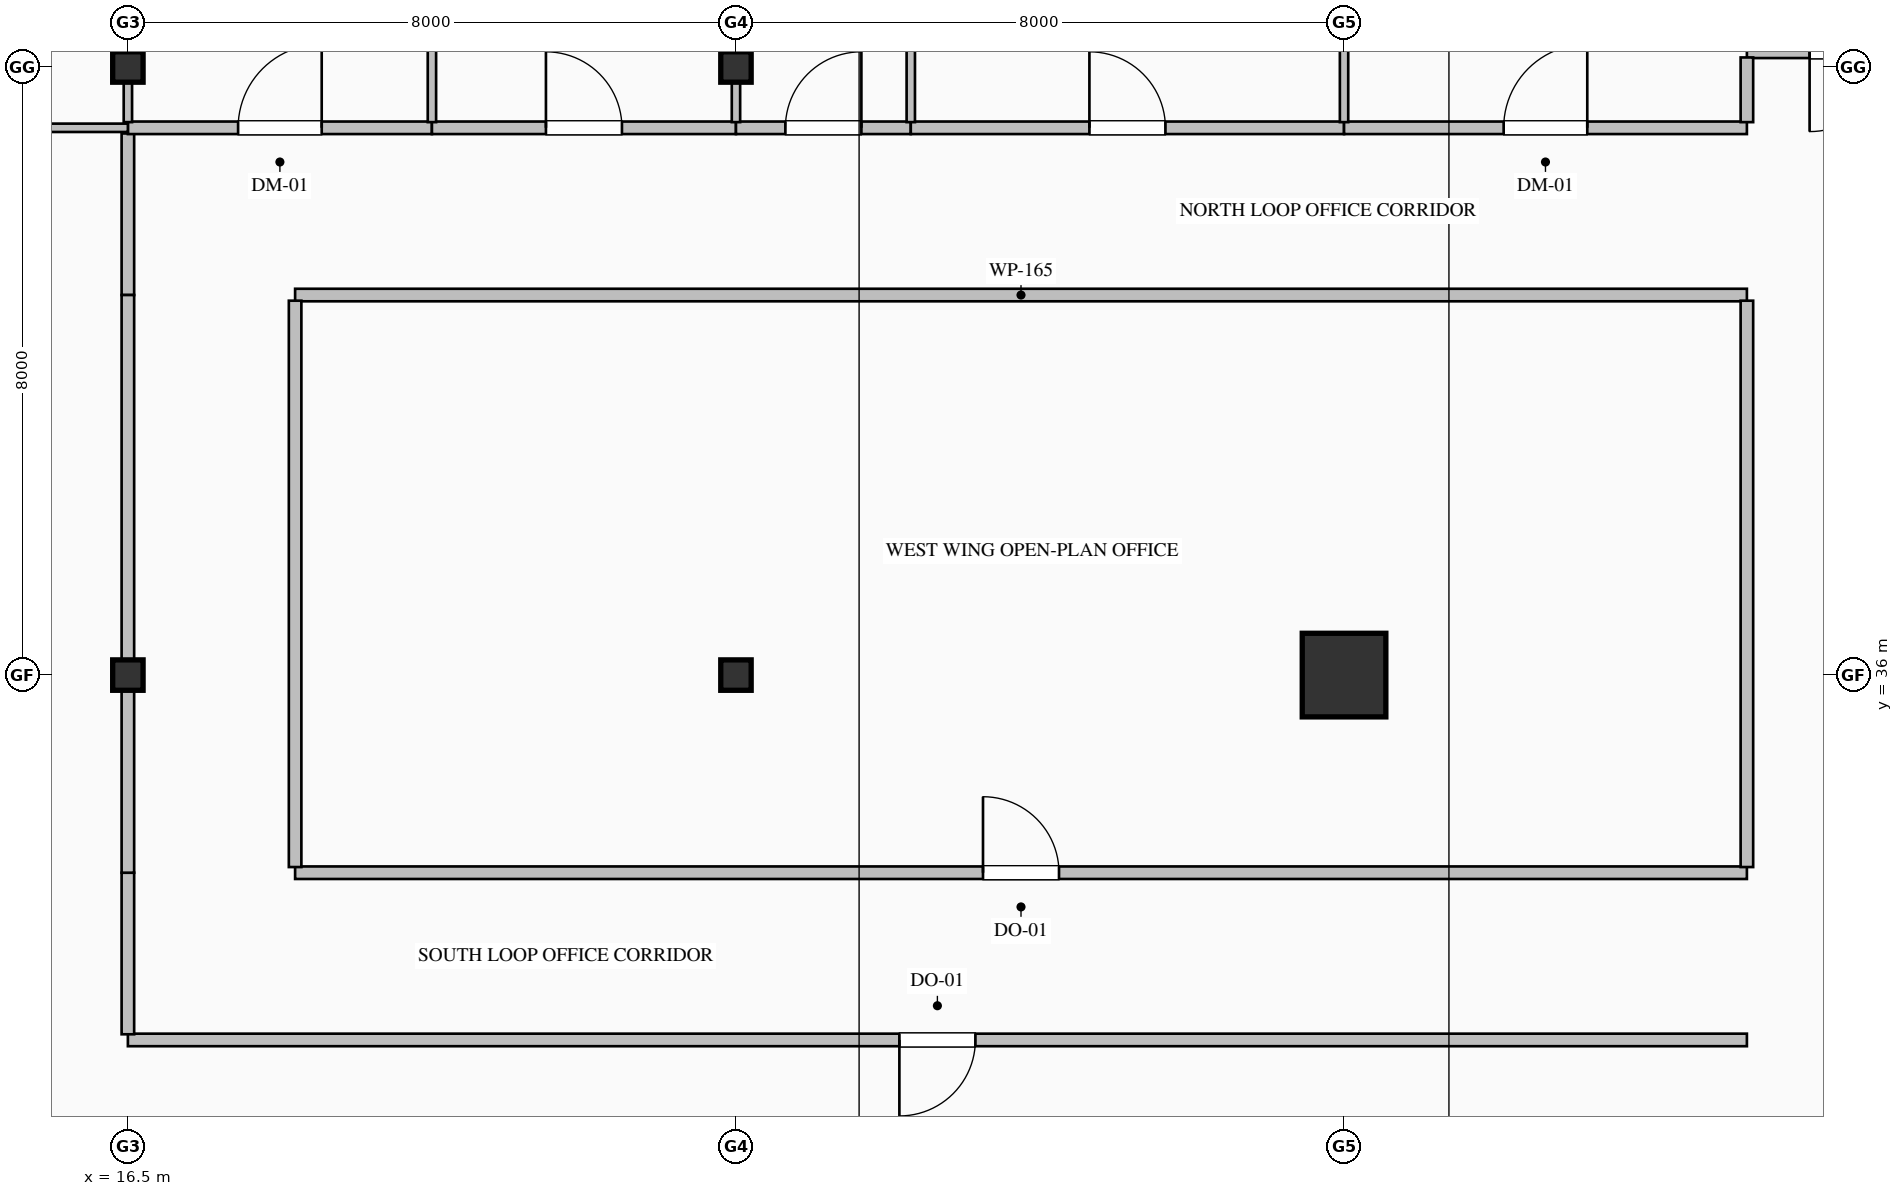
"""IFC4 building model, lengths in metres.
Left out: names, types, materials, properties, quantities, classifications, styles, units other than length and angle.
Written with IfcOpenShell. Run it as: python <this file> out.ifc"""

import sys

from ifc_helpers import new_model, si_unit, direction, frame, frame_2d, origin, origin_2d, place, context, subcontext, project, spatial, rectangle, hollow_rectangle, i_section, extrude, element, fill, save


model = new_model("IFC4")
c1 = context("Model", 3, precision=1e-05, world=origin(), true_north=direction((0.0, 1.0)))
c2 = subcontext(c1, "Body", "Model", "MODEL_VIEW")
j1 = project(units=[si_unit("LENGTHUNIT", "METRE"), si_unit("PLANEANGLEUNIT", "RADIAN")], contexts=[c1])
p1 = place(None, origin())
s1 = spatial("IfcSite", under=j1, at=p1, CompositionType="ELEMENT")
p2 = place(p1, origin())
s2 = spatial("IfcBuilding", under=s1, at=p2, CompositionType="ELEMENT")
p3 = place(p2, frame((0.0, 0.0, 123.0)))
s3 = spatial("IfcBuildingStorey", under=s2, at=p3, CompositionType="ELEMENT", Elevation=123.0)
for number, where, z_axis, x_axis in (
    (1, (16.5, 36.0, 0.0), (0.0, 0.0, 1.0), (1.0, 0.0, 0.0)),
    (2, (16.5, 44.0, 0.0), (0.0, 0.0, 1.0), (1.0, 0.0, 0.0)),
    (3, (24.5, 36.0, 0.0), (0.0, 0.0, 1.0), (1.0, 0.0, 0.0)),
    (4, (24.5, 44.0, 0.0), (0.0, 0.0, 1.0), (1.0, 0.0, 0.0)),
):
    element("IfcColumn", number, at=place(p3, frame(where, z_axis=z_axis, x_axis=x_axis)), inside=s3, PredefinedType="COLUMN", context=c2, shape_type="SweptSolid", body=[
        extrude(i_section(OverallWidth=0.4, OverallDepth=0.4, WebThickness=0.013, FlangeThickness=0.021, FilletRadius=0.022, at=origin_2d()), origin(), (0.0, 0.0, 1.0), 4.0),
    ])
p4 = place(p3, frame((32.5, 36.0, 0.0), z_axis=(0.0, 0.0, 1.0), x_axis=(1.0, 0.0, 0.0)))
e5 = element("IfcColumn", 5, at=p4, inside=s3, PredefinedType="COLUMN", context=c2, shape_type="SweptSolid", body=[
    extrude(hollow_rectangle(XDim=1.1, YDim=1.1, WallThickness=0.04, at=origin_2d()), origin(), (0.0, 0.0, 1.0), 4.0),
])
p5 = place(p3, frame((40.5, 44.2, 0.0), z_axis=(0.0, 0.0, 1.0), x_axis=(-1.0, 0.0, 0.0)))
e6 = element("IfcWall", 6, at=p5, inside=s3, PredefinedType="PARTITIONING", context=c2, shape_type="SweptSolid", body=[
    extrude(rectangle(XDim=2.7, YDim=0.165, at=frame_2d((1.35, 0.0))), origin(), (0.0, 0.0, 1.0), 3.765),
])
p6 = place(p5, frame((0.825, 0.0, 0.0)))
e7 = element("IfcOpeningElement", 7, at=p6, cuts=e6, PredefinedType="OPENING", context=c2, shape_type="SweptSolid", body=[
    extrude(rectangle(XDim=1.05, YDim=2.15, at=frame_2d((0.525, 1.075))), frame((0.0, 0.093, 0.0), z_axis=(0.0, -1.0, 0.0), x_axis=(1.0, 0.0, 0.0)), (0.0, 0.0, 1.0), 0.185),
])
p7 = place(p3, frame((37.8, 31.2, 0.0), z_axis=(0.0, 0.0, 1.0), x_axis=(-1.0, 0.0, 0.0)))
e8 = element("IfcWall", 8, at=p7, inside=s3, PredefinedType="PARTITIONING", context=c2, shape_type="SweptSolid", body=[
    extrude(rectangle(XDim=21.3, YDim=0.165, at=frame_2d((10.65, 0.0))), origin(), (0.0, 0.0, 1.0), 3.765),
])
p8 = place(p7, frame((10.15, 0.0, 0.0)))
e9 = element("IfcOpeningElement", 9, at=p8, cuts=e8, PredefinedType="OPENING", context=c2, shape_type="SweptSolid", body=[
    extrude(rectangle(XDim=1.0, YDim=2.15, at=frame_2d((0.5, 1.075))), frame((0.0, 0.093, 0.0), z_axis=(0.0, -1.0, 0.0), x_axis=(1.0, 0.0, 0.0)), (0.0, 0.0, 1.0), 0.185),
])
p9 = place(p3, frame((16.5, 31.274, 0.0), z_axis=(0.0, 0.0, 1.0), x_axis=(0.0, 1.0, 0.0)))
e10 = element("IfcWall", 10, at=p9, inside=s3, PredefinedType="PARTITIONING", context=c2, shape_type="SweptSolid", body=[
    extrude(rectangle(XDim=2.125, YDim=0.165, at=frame_2d((1.063, 0.0))), origin(), (0.0, 0.0, 1.0), 3.157),
])
p10 = place(p3, frame((18.7, 33.4, 0.0), z_axis=(0.0, 0.0, 1.0), x_axis=(1.0, 0.0, 0.0)))
e11 = element("IfcWall", 11, at=p10, inside=s3, PredefinedType="PARTITIONING", context=c2, shape_type="SweptSolid", body=[
    extrude(rectangle(XDim=19.1, YDim=0.165, at=frame_2d((9.55, 0.0))), origin(), (0.0, 0.0, 1.0), 3.765),
])
p11 = place(p10, frame((9.05, 0.0, 0.0)))
e12 = element("IfcOpeningElement", 12, at=p11, cuts=e11, PredefinedType="OPENING", context=c2, shape_type="SweptSolid", body=[
    extrude(rectangle(XDim=1.0, YDim=2.15, at=frame_2d((0.5, 1.075))), frame((0.0, 0.093, 0.0), z_axis=(0.0, -1.0, 0.0), x_axis=(1.0, 0.0, 0.0)), (0.0, 0.0, 1.0), 0.185),
])
p12 = place(p3, frame((16.5, 41.0, 0.0), z_axis=(0.0, 0.0, 1.0), x_axis=(0.0, 1.0, 0.0)))
e13 = element("IfcWall", 13, at=p12, inside=s3, PredefinedType="PARTITIONING", context=c2, shape_type="SweptSolid", body=[
    extrude(rectangle(XDim=2.125, YDim=0.165, at=frame_2d((1.063, 0.0))), origin(), (0.0, 0.0, 1.0), 3.157),
])
p13 = place(p3, frame((37.8, 41.0, 0.0), z_axis=(0.0, 0.0, 1.0), x_axis=(-1.0, 0.0, 0.0)))
e14 = element("IfcWall", 14, at=p13, inside=s3, PredefinedType="PARTITIONING", context=c2, shape_type="SweptSolid", body=[
    extrude(rectangle(XDim=19.1, YDim=0.165, at=frame_2d((9.55, 0.0))), origin(), (0.0, 0.0, 1.0), 3.765),
])
p14 = place(p3, frame((16.5, 43.2, 0.0), z_axis=(0.0, 0.0, 1.0), x_axis=(1.0, 0.0, 0.0)))
e15 = element("IfcWall", 15, at=p14, inside=s3, PredefinedType="PARTITIONING", context=c2, shape_type="SweptSolid", body=[
    extrude(rectangle(XDim=4.0, YDim=0.165, at=frame_2d((2.0, 0.0))), origin(), (0.0, 0.0, 1.0), 3.765),
])
p15 = place(p14, frame((1.45, 0.0, 0.0)))
e16 = element("IfcOpeningElement", 16, at=p15, cuts=e15, PredefinedType="OPENING", context=c2, shape_type="SweptSolid", body=[
    extrude(rectangle(XDim=1.1, YDim=2.2, at=frame_2d((0.55, 1.1))), frame((0.0, 0.093, 0.0), z_axis=(0.0, -1.0, 0.0), x_axis=(1.0, 0.0, 0.0)), (0.0, 0.0, 1.0), 0.185),
])
p16 = place(p3, frame((20.5, 43.2, 0.0), z_axis=(0.0, 0.0, 1.0), x_axis=(1.0, 0.0, 0.0)))
e17 = element("IfcWall", 17, at=p16, inside=s3, PredefinedType="PARTITIONING", context=c2, shape_type="SweptSolid", body=[
    extrude(rectangle(XDim=4.0, YDim=0.165, at=frame_2d((2.0, 0.0))), origin(), (0.0, 0.0, 1.0), 3.765),
])
p17 = place(p16, frame((1.5, 0.0, 0.0)))
e18 = element("IfcOpeningElement", 18, at=p17, cuts=e17, PredefinedType="OPENING", context=c2, shape_type="SweptSolid", body=[
    extrude(rectangle(XDim=1.0, YDim=2.15, at=frame_2d((0.5, 1.075))), frame((0.0, 0.093, 0.0), z_axis=(0.0, -1.0, 0.0), x_axis=(1.0, 0.0, 0.0)), (0.0, 0.0, 1.0), 0.185),
])
p18 = place(p3, frame((24.5, 43.2, 0.0), z_axis=(0.0, 0.0, 1.0), x_axis=(1.0, 0.0, 0.0)))
e19 = element("IfcWall", 19, at=p18, inside=s3, PredefinedType="PARTITIONING", context=c2, shape_type="SweptSolid", body=[
    extrude(rectangle(XDim=2.3, YDim=0.165, at=frame_2d((1.15, 0.0))), origin(), (0.0, 0.0, 1.0), 3.765),
])
p19 = place(p18, frame((0.65, 0.0, 0.0)))
e20 = element("IfcOpeningElement", 20, at=p19, cuts=e19, PredefinedType="OPENING", context=c2, shape_type="SweptSolid", body=[
    extrude(rectangle(XDim=1.0, YDim=2.15, at=frame_2d((0.5, 1.075))), frame((0.0, 0.093, 0.0), z_axis=(0.0, -1.0, 0.0), x_axis=(1.0, 0.0, 0.0)), (0.0, 0.0, 1.0), 0.185),
])
p20 = place(p3, frame((26.8, 43.2, 0.0), z_axis=(0.0, 0.0, 1.0), x_axis=(1.0, 0.0, 0.0)))
e21 = element("IfcWall", 21, at=p20, inside=s3, PredefinedType="PARTITIONING", context=c2, shape_type="SweptSolid", body=[
    extrude(rectangle(XDim=5.7, YDim=0.165, at=frame_2d((2.85, 0.0))), origin(), (0.0, 0.0, 1.0), 3.765),
])
p21 = place(p20, frame((2.35, 0.0, 0.0)))
e22 = element("IfcOpeningElement", 22, at=p21, cuts=e21, PredefinedType="OPENING", context=c2, shape_type="SweptSolid", body=[
    extrude(rectangle(XDim=1.0, YDim=2.15, at=frame_2d((0.5, 1.075))), frame((0.0, 0.093, 0.0), z_axis=(0.0, -1.0, 0.0), x_axis=(1.0, 0.0, 0.0)), (0.0, 0.0, 1.0), 0.185),
])
p22 = place(p3, frame((32.5, 43.2, 0.0), z_axis=(0.0, 0.0, 1.0), x_axis=(1.0, 0.0, 0.0)))
e23 = element("IfcWall", 23, at=p22, inside=s3, PredefinedType="PARTITIONING", context=c2, shape_type="SweptSolid", body=[
    extrude(rectangle(XDim=5.3, YDim=0.165, at=frame_2d((2.65, 0.0))), origin(), (0.0, 0.0, 1.0), 3.765),
])
p23 = place(p22, frame((2.1, 0.0, 0.0)))
e24 = element("IfcOpeningElement", 24, at=p23, cuts=e23, PredefinedType="OPENING", context=c2, shape_type="SweptSolid", body=[
    extrude(rectangle(XDim=1.1, YDim=2.2, at=frame_2d((0.55, 1.1))), frame((0.0, 0.093, 0.0), z_axis=(0.0, -1.0, 0.0), x_axis=(1.0, 0.0, 0.0)), (0.0, 0.0, 1.0), 0.185),
])
p24 = place(p3, frame((16.5, 33.4, 0.0), z_axis=(0.0, 0.0, 1.0), x_axis=(0.0, 1.0, 0.0)))
e25 = element("IfcWall", 25, at=p24, inside=s3, PredefinedType="PARTITIONING", context=c2, shape_type="SweptSolid", body=[
    extrude(rectangle(XDim=7.6, YDim=0.165, at=frame_2d((3.8, 0.0))), origin(), (0.0, 0.0, 1.0), 3.157),
])
for number, where, z_axis, x_axis in (
    (26, (18.7, 40.926, 0.0), (0.0, 0.0, 1.0), (0.0, -1.0, 0.0)),
    (27, (37.8, 33.475, 0.0), (0.0, 0.0, 1.0), (0.0, 1.0, 0.0)),
):
    element("IfcWall", number, at=place(p3, frame(where, z_axis=z_axis, x_axis=x_axis)), inside=s3, PredefinedType="PARTITIONING", context=c2, shape_type="SweptSolid", body=[
        extrude(rectangle(XDim=7.451, YDim=0.165, at=frame_2d((3.726, 0.0))), origin(), (0.0, 0.0, 1.0), 3.765),
    ])
p25 = place(p3, frame((37.8, 43.274, 0.0), z_axis=(0.0, 0.0, 1.0), x_axis=(0.0, 1.0, 0.0)))
e28 = element("IfcWall", 28, at=p25, inside=s3, PredefinedType="PARTITIONING", context=c2, shape_type="SweptSolid", body=[
    extrude(rectangle(XDim=0.851, YDim=0.165, at=frame_2d((0.426, 0.0))), origin(), (0.0, 0.0, 1.0), 3.765),
])
p26 = place(p3, frame((12.8, 43.2, 0.0), z_axis=(0.0, 0.0, 1.0), x_axis=(1.0, 0.0, 0.0)))
e29 = element("IfcWall", 29, at=p26, inside=s3, PredefinedType="MOVABLE", context=c2, shape_type="SweptSolid", body=[
    extrude(rectangle(XDim=3.7, YDim=0.11, at=frame_2d((1.85, 0.0))), origin(), (0.0, 0.0, 1.0), 3.765),
])
p27 = place(p3, frame((16.5, 51.668, 0.0), z_axis=(0.0, 0.0, 1.0), x_axis=(0.0, -1.0, 0.0)))
e30 = element("IfcWall", 30, at=p27, inside=s3, PredefinedType="MOVABLE", context=c2, shape_type="SweptSolid", body=[
    extrude(rectangle(XDim=8.394, YDim=0.11, at=frame_2d((4.197, 0.0))), origin(), (0.0, 0.0, 1.0), 3.157),
])
p28 = place(p27, frame((3.697, 0.0, 0.0)))
e31 = element("IfcOpeningElement", 31, at=p28, cuts=e30, PredefinedType="OPENING", context=c2, shape_type="SweptSolid", body=[
    extrude(rectangle(XDim=1.0, YDim=2.15, at=frame_2d((0.5, 1.075))), frame((0.0, 0.065, 0.0), z_axis=(0.0, -1.0, 0.0), x_axis=(1.0, 0.0, 0.0)), (0.0, 0.0, 1.0), 0.13),
])
p29 = place(p3, frame((20.5, 51.668, 0.0), z_axis=(0.0, 0.0, 1.0), x_axis=(0.0, -1.0, 0.0)))
e32 = element("IfcWall", 32, at=p29, inside=s3, PredefinedType="MOVABLE", context=c2, shape_type="SweptSolid", body=[
    extrude(rectangle(XDim=8.394, YDim=0.11, at=frame_2d((4.197, 0.0))), origin(), (0.0, 0.0, 1.0), 3.765),
])
p30 = place(p3, frame((24.5, 51.668, 0.0), z_axis=(0.0, 0.0, 1.0), x_axis=(0.0, -1.0, 0.0)))
e33 = element("IfcWall", 33, at=p30, inside=s3, PredefinedType="MOVABLE", context=c2, shape_type="SweptSolid", body=[
    extrude(rectangle(XDim=8.394, YDim=0.11, at=frame_2d((4.197, 0.0))), origin(), (0.0, 0.0, 1.0), 3.157),
])
for number, where, z_axis, x_axis in (
    (34, (26.8, 51.668, 0.0), (0.0, 0.0, 1.0), (0.0, -1.0, 0.0)),
    (35, (32.5, 51.668, 0.0), (0.0, 0.0, 1.0), (0.0, -1.0, 0.0)),
):
    element("IfcWall", number, at=place(p3, frame(where, z_axis=z_axis, x_axis=x_axis)), inside=s3, PredefinedType="MOVABLE", context=c2, shape_type="SweptSolid", body=[
        extrude(rectangle(XDim=8.394, YDim=0.11, at=frame_2d((4.197, 0.0))), origin(), (0.0, 0.0, 1.0), 3.765),
    ])
p31 = place(p6, origin())
e36 = element("IfcDoor", 36, at=p31, inside=s3, OperationType="SINGLE_SWING_RIGHT", PredefinedType="DOOR", context=c2, shape_type="SweptSolid", body=[
    extrude(rectangle(XDim=1.05, YDim=2.15, at=frame_2d((0.525, 1.075))), frame((0.0, 0.025, 0.0), z_axis=(0.0, -1.0, 0.0), x_axis=(1.0, 0.0, 0.0)), (0.0, 0.0, 1.0), 0.05),
])
fill(e7, e36)
p32 = place(p8, origin())
e37 = element("IfcDoor", 37, at=p32, inside=s3, OperationType="SINGLE_SWING_RIGHT", PredefinedType="DOOR", context=c2, shape_type="SweptSolid", body=[
    extrude(rectangle(XDim=1.0, YDim=2.15, at=frame_2d((0.5, 1.075))), frame((0.0, 0.025, 0.0), z_axis=(0.0, -1.0, 0.0), x_axis=(1.0, 0.0, 0.0)), (0.0, 0.0, 1.0), 0.05),
])
fill(e9, e37)
p33 = place(p11, origin())
e38 = element("IfcDoor", 38, at=p33, inside=s3, OperationType="SINGLE_SWING_LEFT", PredefinedType="DOOR", context=c2, shape_type="SweptSolid", body=[
    extrude(rectangle(XDim=1.0, YDim=2.15, at=frame_2d((0.5, 1.075))), frame((0.0, 0.025, 0.0), z_axis=(0.0, -1.0, 0.0), x_axis=(1.0, 0.0, 0.0)), (0.0, 0.0, 1.0), 0.05),
])
fill(e12, e38)
p34 = place(p15, origin())
e39 = element("IfcDoor", 39, at=p34, inside=s3, OperationType="SINGLE_SWING_RIGHT", PredefinedType="DOOR", context=c2, shape_type="SweptSolid", body=[
    extrude(rectangle(XDim=1.1, YDim=2.2, at=frame_2d((0.55, 1.1))), frame((0.0, 0.025, 0.0), z_axis=(0.0, -1.0, 0.0), x_axis=(1.0, 0.0, 0.0)), (0.0, 0.0, 1.0), 0.05),
])
fill(e16, e39)
p35 = place(p17, origin())
e40 = element("IfcDoor", 40, at=p35, inside=s3, OperationType="SINGLE_SWING_LEFT", PredefinedType="DOOR", context=c2, shape_type="SweptSolid", body=[
    extrude(rectangle(XDim=1.0, YDim=2.15, at=frame_2d((0.5, 1.075))), frame((0.0, 0.025, 0.0), z_axis=(0.0, -1.0, 0.0), x_axis=(1.0, 0.0, 0.0)), (0.0, 0.0, 1.0), 0.05),
])
fill(e18, e40)
p36 = place(p19, origin())
e41 = element("IfcDoor", 41, at=p36, inside=s3, OperationType="SINGLE_SWING_RIGHT", PredefinedType="DOOR", context=c2, shape_type="SweptSolid", body=[
    extrude(rectangle(XDim=1.0, YDim=2.15, at=frame_2d((0.5, 1.075))), frame((0.0, 0.025, 0.0), z_axis=(0.0, -1.0, 0.0), x_axis=(1.0, 0.0, 0.0)), (0.0, 0.0, 1.0), 0.05),
])
fill(e20, e41)
p37 = place(p21, origin())
e42 = element("IfcDoor", 42, at=p37, inside=s3, OperationType="SINGLE_SWING_LEFT", PredefinedType="DOOR", context=c2, shape_type="SweptSolid", body=[
    extrude(rectangle(XDim=1.0, YDim=2.15, at=frame_2d((0.5, 1.075))), frame((0.0, 0.025, 0.0), z_axis=(0.0, -1.0, 0.0), x_axis=(1.0, 0.0, 0.0)), (0.0, 0.0, 1.0), 0.05),
])
fill(e22, e42)
p38 = place(p23, origin())
e43 = element("IfcDoor", 43, at=p38, inside=s3, OperationType="SINGLE_SWING_RIGHT", PredefinedType="DOOR", context=c2, shape_type="SweptSolid", body=[
    extrude(rectangle(XDim=1.1, YDim=2.2, at=frame_2d((0.55, 1.1))), frame((0.0, 0.025, 0.0), z_axis=(0.0, -1.0, 0.0), x_axis=(1.0, 0.0, 0.0)), (0.0, 0.0, 1.0), 0.05),
])
fill(e24, e43)
save(model, sys.argv[1])
